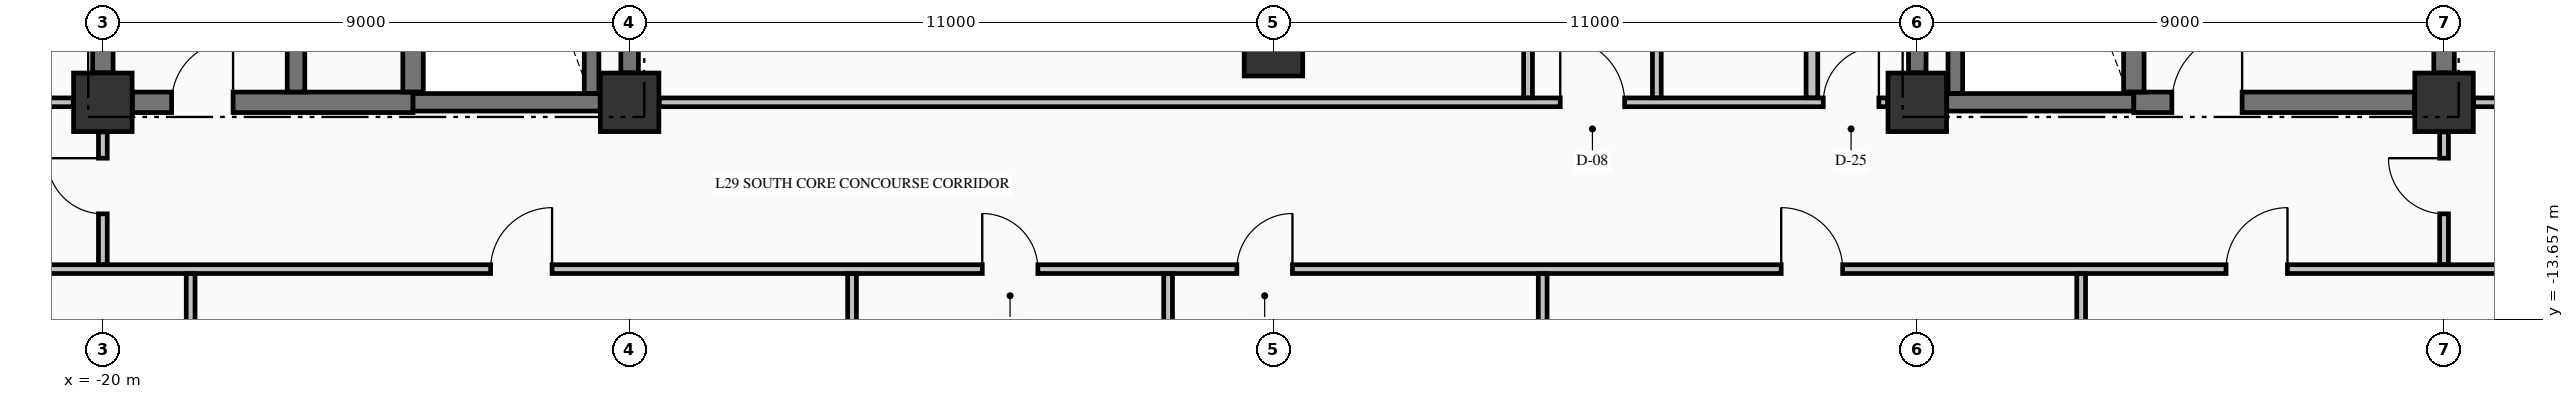
"""IFC4 building model, lengths in metres.
Left out: names, types, materials, properties, quantities, classifications, styles, units other than length and angle.
Written with IfcOpenShell. Run it as: python <this file> out.ifc"""

import sys

from ifc_helpers import new_model, si_unit, direction, frame, frame_2d, origin, origin_2d, place, context, subcontext, project, spatial, rectangle, extrude, element, fill, save


model = new_model("IFC4")
c1 = context("Model", 3, precision=1e-05, world=origin(), true_north=direction((0.0, 1.0)))
c2 = subcontext(c1, "Body", "Model", "MODEL_VIEW")
j1 = project(units=[si_unit("LENGTHUNIT", "METRE"), si_unit("PLANEANGLEUNIT", "RADIAN")], contexts=[c1])
p1 = place(None, origin())
s1 = spatial("IfcSite", under=j1, at=p1, CompositionType="ELEMENT")
p2 = place(p1, origin())
s2 = spatial("IfcBuilding", under=s1, at=p2, CompositionType="ELEMENT")
p3 = place(p2, frame((0.0, 0.0, 116.35)))
s3 = spatial("IfcBuildingStorey", under=s2, at=p3, CompositionType="ELEMENT", Elevation=116.35)
for number, where, z_axis, x_axis in (
    (1, (-20.0, -9.95, -0.425), (0.0, 0.0, 1.0), (1.0, 0.0, 0.0)),
    (2, (-11.0, -9.95, -0.425), (0.0, 0.0, 1.0), (1.0, 0.0, 0.0)),
    (3, (11.0, -9.95, -0.425), (0.0, 0.0, 1.0), (1.0, 0.0, 0.0)),
    (4, (20.0, -9.95, -0.425), (0.0, 0.0, 1.0), (1.0, 0.0, 0.0)),
    (5, (0.0, -9.0, -0.425), (0.0, 0.0, 1.0), (1.0, 0.0, 0.0)),
):
    element("IfcColumn", number, at=place(p3, frame(where, z_axis=z_axis, x_axis=x_axis)), inside=s3, PredefinedType="COLUMN", context=c2, shape_type="SweptSolid", body=[
        extrude(rectangle(XDim=1.0, YDim=1.0, at=origin_2d()), origin(), (0.0, 0.0, 1.0), 5.0),
    ])
p4 = place(p3, frame((-19.496, -9.95, 0.0), z_axis=(0.0, 0.0, 1.0), x_axis=(1.0, 0.0, 0.0)))
e6 = element("IfcWall", 6, at=p4, inside=s3, PredefinedType="SHEAR", context=c2, shape_type="SweptSolid", body=[
    extrude(rectangle(XDim=4.796, YDim=0.35, at=frame_2d((2.398, 0.0))), origin(), (0.0, 0.0, 1.0), 4.575),
])
p5 = place(p4, frame((0.671, 0.0, 0.0)))
e7 = element("IfcOpeningElement", 7, at=p5, cuts=e6, PredefinedType="OPENING", context=c2, shape_type="SweptSolid", body=[
    extrude(rectangle(XDim=1.05, YDim=2.15, at=frame_2d((0.525, 1.075))), frame((0.0, 0.185, 0.0), z_axis=(0.0, -1.0, 0.0), x_axis=(1.0, 0.0, 0.0)), (0.0, 0.0, 1.0), 0.37),
])
for number, where, z_axis, x_axis in (
    (8, (-14.7, -9.95, 0.0), (0.0, 0.0, 1.0), (1.0, 0.0, 0.0)),
    (9, (11.504, -9.95, 0.0), (0.0, 0.0, 1.0), (1.0, 0.0, 0.0)),
):
    element("IfcWall", number, at=place(p3, frame(where, z_axis=z_axis, x_axis=x_axis)), inside=s3, PredefinedType="SHEAR", context=c2, shape_type="SweptSolid", body=[
        extrude(rectangle(XDim=3.196, YDim=0.3, at=frame_2d((1.598, 0.0))), origin(), (0.0, 0.0, 1.0), 4.575),
    ])
p6 = place(p3, frame((14.7, -9.95, 0.0), z_axis=(0.0, 0.0, 1.0), x_axis=(1.0, 0.0, 0.0)))
e10 = element("IfcWall", 10, at=p6, inside=s3, PredefinedType="SHEAR", context=c2, shape_type="SweptSolid", body=[
    extrude(rectangle(XDim=4.796, YDim=0.35, at=frame_2d((2.398, 0.0))), origin(), (0.0, 0.0, 1.0), 4.575),
])
p7 = place(p6, frame((0.65, 0.0, 0.0)))
e11 = element("IfcOpeningElement", 11, at=p7, cuts=e10, PredefinedType="OPENING", context=c2, shape_type="SweptSolid", body=[
    extrude(rectangle(XDim=1.2, YDim=2.15, at=frame_2d((0.6, 1.075))), frame((0.0, 0.185, 0.0), z_axis=(0.0, -1.0, 0.0), x_axis=(1.0, 0.0, 0.0)), (0.0, 0.0, 1.0), 0.37),
])
p8 = place(p3, frame((-22.835, -12.8, 0.0), z_axis=(0.0, 0.0, 1.0), x_axis=(1.0, 0.0, 0.0)))
e12 = element("IfcWall", 12, at=p8, inside=s3, PredefinedType="PARTITIONING", context=c2, shape_type="SweptSolid", body=[
    extrude(rectangle(XDim=50.67, YDim=0.15, at=frame_2d((25.335, 0.0))), origin(), (0.0, 0.0, 1.0), 4.575),
])
p9 = place(p8, frame((9.46, 0.0, 0.0)))
e13 = element("IfcOpeningElement", 13, at=p9, cuts=e12, PredefinedType="OPENING", context=c2, shape_type="SweptSolid", body=[
    extrude(rectangle(XDim=1.05, YDim=2.15, at=frame_2d((0.525, 1.075))), frame((0.0, 0.085, 0.0), z_axis=(0.0, -1.0, 0.0), x_axis=(1.0, 0.0, 0.0)), (0.0, 0.0, 1.0), 0.17),
])
p10 = place(p8, frame((17.86, 0.0, 0.0)))
e14 = element("IfcOpeningElement", 14, at=p10, cuts=e12, PredefinedType="OPENING", context=c2, shape_type="SweptSolid", body=[
    extrude(rectangle(XDim=0.95, YDim=2.15, at=frame_2d((0.475, 1.075))), frame((0.0, 0.085, 0.0), z_axis=(0.0, -1.0, 0.0), x_axis=(1.0, 0.0, 0.0)), (0.0, 0.0, 1.0), 0.17),
])
p11 = place(p8, frame((22.21, 0.0, 0.0)))
e15 = element("IfcOpeningElement", 15, at=p11, cuts=e12, PredefinedType="OPENING", context=c2, shape_type="SweptSolid", body=[
    extrude(rectangle(XDim=0.95, YDim=2.02, at=frame_2d((0.475, 1.01))), frame((0.0, 0.085, 0.0), z_axis=(0.0, -1.0, 0.0), x_axis=(1.0, 0.0, 0.0)), (0.0, 0.0, 1.0), 0.17),
])
p12 = place(p8, frame((31.51, 0.0, 0.0)))
e16 = element("IfcOpeningElement", 16, at=p12, cuts=e12, PredefinedType="OPENING", context=c2, shape_type="SweptSolid", body=[
    extrude(rectangle(XDim=1.05, YDim=2.15, at=frame_2d((0.525, 1.075))), frame((0.0, 0.085, 0.0), z_axis=(0.0, -1.0, 0.0), x_axis=(1.0, 0.0, 0.0)), (0.0, 0.0, 1.0), 0.17),
])
p13 = place(p8, frame((39.11, 0.0, 0.0)))
e17 = element("IfcOpeningElement", 17, at=p13, cuts=e12, PredefinedType="OPENING", context=c2, shape_type="SweptSolid", body=[
    extrude(rectangle(XDim=1.05, YDim=2.15, at=frame_2d((0.525, 1.075))), frame((0.0, 0.085, 0.0), z_axis=(0.0, -1.0, 0.0), x_axis=(1.0, 0.0, 0.0)), (0.0, 0.0, 1.0), 0.17),
])
p14 = place(p3, frame((-22.835, -9.95, 0.0), z_axis=(0.0, 0.0, 1.0), x_axis=(1.0, 0.0, 0.0)))
e18 = element("IfcWall", 18, at=p14, inside=s3, PredefinedType="PARTITIONING", context=c2, shape_type="SweptSolid", body=[
    extrude(rectangle(XDim=2.329, YDim=0.15, at=frame_2d((1.165, 0.0))), origin(), (0.0, 0.0, 1.0), 4.575),
])
p15 = place(p14, frame((0.835, 0.0, 0.0)))
e19 = element("IfcOpeningElement", 19, at=p15, cuts=e18, PredefinedType="OPENING", context=c2, shape_type="SweptSolid", body=[
    extrude(rectangle(XDim=1.0, YDim=2.15, at=frame_2d((0.5, 1.075))), frame((0.0, 0.085, 0.0), z_axis=(0.0, -1.0, 0.0), x_axis=(1.0, 0.0, 0.0)), (0.0, 0.0, 1.0), 0.17),
])
p16 = place(p3, frame((-10.494, -9.95, 0.0), z_axis=(0.0, 0.0, 1.0), x_axis=(1.0, 0.0, 0.0)))
e20 = element("IfcWall", 20, at=p16, inside=s3, PredefinedType="PARTITIONING", context=c2, shape_type="SweptSolid", body=[
    extrude(rectangle(XDim=20.988, YDim=0.15, at=frame_2d((10.494, 0.0))), origin(), (0.0, 0.0, 1.0), 4.575),
])
p17 = place(p16, frame((15.394, 0.0, 0.0)))
e21 = element("IfcOpeningElement", 21, at=p17, cuts=e20, PredefinedType="OPENING", context=c2, shape_type="SweptSolid", body=[
    extrude(rectangle(XDim=1.1, YDim=2.15, at=frame_2d((0.55, 1.075))), frame((0.0, 0.085, 0.0), z_axis=(0.0, -1.0, 0.0), x_axis=(1.0, 0.0, 0.0)), (0.0, 0.0, 1.0), 0.17),
])
p18 = place(p16, frame((19.888, 0.0, 0.0)))
e22 = element("IfcOpeningElement", 22, at=p18, cuts=e20, PredefinedType="OPENING", context=c2, shape_type="SweptSolid", body=[
    extrude(rectangle(XDim=0.95, YDim=2.02, at=frame_2d((0.475, 1.01))), frame((0.0, 0.085, 0.0), z_axis=(0.0, -1.0, 0.0), x_axis=(1.0, 0.0, 0.0)), (0.0, 0.0, 1.0), 0.17),
])
p19 = place(p3, frame((20.506, -9.95, 0.0), z_axis=(0.0, 0.0, 1.0), x_axis=(1.0, 0.0, 0.0)))
e23 = element("IfcWall", 23, at=p19, inside=s3, PredefinedType="PARTITIONING", context=c2, shape_type="SweptSolid", body=[
    extrude(rectangle(XDim=7.329, YDim=0.15, at=frame_2d((3.665, 0.0))), origin(), (0.0, 0.0, 1.0), 4.575),
])
p20 = place(p19, frame((3.019, 0.0, 0.0)))
e24 = element("IfcOpeningElement", 24, at=p20, cuts=e23, PredefinedType="OPENING", context=c2, shape_type="SweptSolid", body=[
    extrude(rectangle(XDim=0.95, YDim=2.02, at=frame_2d((0.475, 1.01))), frame((0.0, 0.085, 0.0), z_axis=(0.0, -1.0, 0.0), x_axis=(1.0, 0.0, 0.0)), (0.0, 0.0, 1.0), 0.17),
])
p21 = place(p3, frame((-20.0, -9.446, 0.0), z_axis=(0.0, 0.0, 1.0), x_axis=(0.0, 1.0, 0.0)))
e25 = element("IfcWall", 25, at=p21, inside=s3, PredefinedType="SHEAR", context=c2, shape_type="SweptSolid", body=[
    extrude(rectangle(XDim=8.942, YDim=0.35, at=frame_2d((4.471, 0.0))), origin(), (0.0, 0.0, 1.0), 4.575),
])
p22 = place(p3, frame((-16.7, -9.773, 0.0), z_axis=(0.0, 0.0, 1.0), x_axis=(0.0, 1.0, 0.0)))
e26 = element("IfcWall", 26, at=p22, inside=s3, PredefinedType="SHEAR", context=c2, shape_type="SweptSolid", body=[
    extrude(rectangle(XDim=9.371, YDim=0.3, at=frame_2d((4.686, 0.0))), origin(), (0.0, 0.0, 1.0), 4.575),
])
p23 = place(p3, frame((-14.7, -9.773, 0.0), z_axis=(0.0, 0.0, 1.0), x_axis=(0.0, 1.0, 0.0)))
e27 = element("IfcWall", 27, at=p23, inside=s3, PredefinedType="SHEAR", context=c2, shape_type="SweptSolid", body=[
    extrude(rectangle(XDim=9.371, YDim=0.35, at=frame_2d((4.686, 0.0))), origin(), (0.0, 0.0, 1.0), 4.575),
])
p24 = place(p3, frame((-11.65, -9.798, 0.0), z_axis=(0.0, 0.0, 1.0), x_axis=(0.0, 1.0, 0.0)))
e28 = element("IfcWall", 28, at=p24, inside=s3, PredefinedType="SOLIDWALL", context=c2, shape_type="SweptSolid", body=[
    extrude(rectangle(XDim=9.396, YDim=0.25, at=frame_2d((4.698, 0.0))), origin(), (0.0, 0.0, 1.0), 4.575),
])
for number, where, z_axis, x_axis in (
    (29, (-11.0, -9.446, 0.0), (0.0, 0.0, 1.0), (0.0, 1.0, 0.0)),
    (30, (11.0, -9.446, 0.0), (0.0, 0.0, 1.0), (0.0, 1.0, 0.0)),
):
    element("IfcWall", number, at=place(p3, frame(where, z_axis=z_axis, x_axis=x_axis)), inside=s3, PredefinedType="SHEAR", context=c2, shape_type="SweptSolid", body=[
        extrude(rectangle(XDim=8.942, YDim=0.3, at=frame_2d((4.471, 0.0))), origin(), (0.0, 0.0, 1.0), 4.575),
    ])
p25 = place(p3, frame((11.65, -9.798, 0.0), z_axis=(0.0, 0.0, 1.0), x_axis=(0.0, 1.0, 0.0)))
e31 = element("IfcWall", 31, at=p25, inside=s3, PredefinedType="SOLIDWALL", context=c2, shape_type="SweptSolid", body=[
    extrude(rectangle(XDim=9.396, YDim=0.25, at=frame_2d((4.698, 0.0))), origin(), (0.0, 0.0, 1.0), 4.575),
])
p26 = place(p3, frame((14.7, -9.773, 0.0), z_axis=(0.0, 0.0, 1.0), x_axis=(0.0, 1.0, 0.0)))
e32 = element("IfcWall", 32, at=p26, inside=s3, PredefinedType="SHEAR", context=c2, shape_type="SweptSolid", body=[
    extrude(rectangle(XDim=9.371, YDim=0.35, at=frame_2d((4.686, 0.0))), origin(), (0.0, 0.0, 1.0), 4.575),
])
p27 = place(p3, frame((20.0, -9.446, 0.0), z_axis=(0.0, 0.0, 1.0), x_axis=(0.0, 1.0, 0.0)))
e33 = element("IfcWall", 33, at=p27, inside=s3, PredefinedType="SHEAR", context=c2, shape_type="SweptSolid", body=[
    extrude(rectangle(XDim=2.269, YDim=0.35, at=frame_2d((1.135, 0.0))), origin(), (0.0, 0.0, 1.0), 4.575),
])
p28 = place(p3, frame((-20.0, -12.722, 0.0), z_axis=(0.0, 0.0, 1.0), x_axis=(0.0, 1.0, 0.0)))
e34 = element("IfcWall", 34, at=p28, inside=s3, PredefinedType="PARTITIONING", context=c2, shape_type="SweptSolid", body=[
    extrude(rectangle(XDim=2.266, YDim=0.15, at=frame_2d((1.133, 0.0))), origin(), (0.0, 0.0, 1.0), 4.065),
])
p29 = place(p28, frame((0.867, 0.0, 0.0)))
e35 = element("IfcOpeningElement", 35, at=p29, cuts=e34, PredefinedType="OPENING", context=c2, shape_type="SweptSolid", body=[
    extrude(rectangle(XDim=0.95, YDim=2.02, at=frame_2d((0.475, 1.01))), frame((0.0, 0.085, 0.0), z_axis=(0.0, -1.0, 0.0), x_axis=(1.0, 0.0, 0.0)), (0.0, 0.0, 1.0), 0.17),
])
p30 = place(p3, frame((-18.5, -20.394, 0.0), z_axis=(0.0, 0.0, 1.0), x_axis=(0.0, 1.0, 0.0)))
e36 = element("IfcWall", 36, at=p30, inside=s3, PredefinedType="PARTITIONING", context=c2, shape_type="SweptSolid", body=[
    extrude(rectangle(XDim=7.516, YDim=0.15, at=frame_2d((3.758, 0.0))), origin(), (0.0, 0.0, 1.0), 4.575),
])
for number, where, z_axis, x_axis in (
    (37, (-7.2, -25.335, 0.0), (0.0, 0.0, 1.0), (0.0, 1.0, 0.0)),
    (38, (-1.8, -25.335, 0.0), (0.0, 0.0, 1.0), (0.0, 1.0, 0.0)),
):
    element("IfcWall", number, at=place(p3, frame(where, z_axis=z_axis, x_axis=x_axis)), inside=s3, PredefinedType="PARTITIONING", context=c2, shape_type="SweptSolid", body=[
        extrude(rectangle(XDim=12.457, YDim=0.15, at=frame_2d((6.229, 0.0))), origin(), (0.0, 0.0, 1.0), 4.575),
    ])
p31 = place(p3, frame((4.35, -9.872, 0.0), z_axis=(0.0, 0.0, 1.0), x_axis=(0.0, 1.0, 0.0)))
e39 = element("IfcWall", 39, at=p31, inside=s3, PredefinedType="PARTITIONING", context=c2, shape_type="SweptSolid", body=[
    extrude(rectangle(XDim=9.544, YDim=0.15, at=frame_2d((4.772, 0.0))), origin(), (0.0, 0.0, 1.0), 4.575),
])
p32 = place(p3, frame((4.6, -25.335, 0.0), z_axis=(0.0, 0.0, 1.0), x_axis=(0.0, 1.0, 0.0)))
e40 = element("IfcWall", 40, at=p32, inside=s3, PredefinedType="PARTITIONING", context=c2, shape_type="SweptSolid", body=[
    extrude(rectangle(XDim=12.457, YDim=0.15, at=frame_2d((6.229, 0.0))), origin(), (0.0, 0.0, 1.0), 4.575),
])
p33 = place(p3, frame((6.55, -9.872, 0.0), z_axis=(0.0, 0.0, 1.0), x_axis=(0.0, 1.0, 0.0)))
e41 = element("IfcWall", 41, at=p33, inside=s3, PredefinedType="PARTITIONING", context=c2, shape_type="SweptSolid", body=[
    extrude(rectangle(XDim=4.419, YDim=0.15, at=frame_2d((2.209, 0.0))), origin(), (0.0, 0.0, 1.0), 4.575),
])
p34 = place(p33, frame((1.997, 0.0, 0.0)))
e42 = element("IfcOpeningElement", 42, at=p34, cuts=e41, PredefinedType="OPENING", context=c2, shape_type="SweptSolid", body=[
    extrude(rectangle(XDim=0.95, YDim=2.15, at=frame_2d((0.475, 1.075))), frame((0.0, 0.085, 0.0), z_axis=(0.0, -1.0, 0.0), x_axis=(1.0, 0.0, 0.0)), (0.0, 0.0, 1.0), 0.17),
])
p35 = place(p3, frame((9.2, -9.872, 0.0), z_axis=(0.0, 0.0, 1.0), x_axis=(0.0, 1.0, 0.0)))
e43 = element("IfcWall", 43, at=p35, inside=s3, PredefinedType="PARTITIONING", context=c2, shape_type="SweptSolid", body=[
    extrude(rectangle(XDim=4.419, YDim=0.2, at=frame_2d((2.209, 0.0))), origin(), (0.0, 0.0, 1.0), 4.575),
])
p36 = place(p3, frame((13.8, -25.335, 0.0), z_axis=(0.0, 0.0, 1.0), x_axis=(0.0, 1.0, 0.0)))
e44 = element("IfcWall", 44, at=p36, inside=s3, PredefinedType="PARTITIONING", context=c2, shape_type="SweptSolid", body=[
    extrude(rectangle(XDim=12.457, YDim=0.15, at=frame_2d((6.229, 0.0))), origin(), (0.0, 0.0, 1.0), 4.575),
])
p37 = place(p3, frame((20.0, -12.722, 0.0), z_axis=(0.0, 0.0, 1.0), x_axis=(0.0, 1.0, 0.0)))
e45 = element("IfcWall", 45, at=p37, inside=s3, PredefinedType="PARTITIONING", context=c2, shape_type="SweptSolid", body=[
    extrude(rectangle(XDim=2.266, YDim=0.15, at=frame_2d((1.133, 0.0))), origin(), (0.0, 0.0, 1.0), 4.03),
])
p38 = place(p37, frame((0.867, 0.0, 0.0)))
e46 = element("IfcOpeningElement", 46, at=p38, cuts=e45, PredefinedType="OPENING", context=c2, shape_type="SweptSolid", body=[
    extrude(rectangle(XDim=0.95, YDim=2.02, at=frame_2d((0.475, 1.01))), frame((0.0, 0.085, 0.0), z_axis=(0.0, -1.0, 0.0), x_axis=(1.0, 0.0, 0.0)), (0.0, 0.0, 1.0), 0.17),
])
p39 = place(p5, origin())
e47 = element("IfcDoor", 47, at=p39, inside=s3, OperationType="SINGLE_SWING_RIGHT", PredefinedType="DOOR", context=c2, shape_type="SweptSolid", body=[
    extrude(rectangle(XDim=1.05, YDim=2.15, at=frame_2d((0.525, 1.075))), frame((0.0, 0.025, 0.0), z_axis=(0.0, -1.0, 0.0), x_axis=(1.0, 0.0, 0.0)), (0.0, 0.0, 1.0), 0.05),
])
fill(e7, e47)
p40 = place(p7, origin())
e48 = element("IfcDoor", 48, at=p40, inside=s3, OperationType="SINGLE_SWING_RIGHT", PredefinedType="DOOR", context=c2, shape_type="SweptSolid", body=[
    extrude(rectangle(XDim=1.2, YDim=2.15, at=frame_2d((0.6, 1.075))), frame((0.0, 0.025, 0.0), z_axis=(0.0, -1.0, 0.0), x_axis=(1.0, 0.0, 0.0)), (0.0, 0.0, 1.0), 0.05),
])
fill(e11, e48)
p41 = place(p17, origin())
e49 = element("IfcDoor", 49, at=p41, inside=s3, OperationType="SINGLE_SWING_LEFT", PredefinedType="DOOR", context=c2, shape_type="SweptSolid", body=[
    extrude(rectangle(XDim=1.1, YDim=2.15, at=frame_2d((0.55, 1.075))), frame((0.0, 0.025, 0.0), z_axis=(0.0, -1.0, 0.0), x_axis=(1.0, 0.0, 0.0)), (0.0, 0.0, 1.0), 0.05),
])
fill(e21, e49)
p42 = place(p9, origin())
e50 = element("IfcDoor", 50, at=p42, inside=s3, OperationType="SINGLE_SWING_RIGHT", PredefinedType="DOOR", context=c2, shape_type="SweptSolid", body=[
    extrude(rectangle(XDim=1.05, YDim=2.15, at=frame_2d((0.525, 1.075))), frame((0.0, 0.025, 0.0), z_axis=(0.0, -1.0, 0.0), x_axis=(1.0, 0.0, 0.0)), (0.0, 0.0, 1.0), 0.05),
])
fill(e13, e50)
p43 = place(p10, origin())
e51 = element("IfcDoor", 51, at=p43, inside=s3, OperationType="SINGLE_SWING_LEFT", PredefinedType="DOOR", context=c2, shape_type="SweptSolid", body=[
    extrude(rectangle(XDim=0.95, YDim=2.15, at=frame_2d((0.475, 1.075))), frame((0.0, 0.025, 0.0), z_axis=(0.0, -1.0, 0.0), x_axis=(1.0, 0.0, 0.0)), (0.0, 0.0, 1.0), 0.05),
])
fill(e14, e51)
p44 = place(p11, origin())
e52 = element("IfcDoor", 52, at=p44, inside=s3, OperationType="SINGLE_SWING_RIGHT", PredefinedType="DOOR", context=c2, shape_type="SweptSolid", body=[
    extrude(rectangle(XDim=0.95, YDim=2.02, at=frame_2d((0.475, 1.01))), frame((0.0, 0.025, 0.0), z_axis=(0.0, -1.0, 0.0), x_axis=(1.0, 0.0, 0.0)), (0.0, 0.0, 1.0), 0.05),
])
fill(e15, e52)
p45 = place(p12, origin())
e53 = element("IfcDoor", 53, at=p45, inside=s3, OperationType="SINGLE_SWING_LEFT", PredefinedType="DOOR", context=c2, shape_type="SweptSolid", body=[
    extrude(rectangle(XDim=1.05, YDim=2.15, at=frame_2d((0.525, 1.075))), frame((0.0, 0.025, 0.0), z_axis=(0.0, -1.0, 0.0), x_axis=(1.0, 0.0, 0.0)), (0.0, 0.0, 1.0), 0.05),
])
fill(e16, e53)
p46 = place(p13, origin())
e54 = element("IfcDoor", 54, at=p46, inside=s3, OperationType="SINGLE_SWING_RIGHT", PredefinedType="DOOR", context=c2, shape_type="SweptSolid", body=[
    extrude(rectangle(XDim=1.05, YDim=2.15, at=frame_2d((0.525, 1.075))), frame((0.0, 0.025, 0.0), z_axis=(0.0, -1.0, 0.0), x_axis=(1.0, 0.0, 0.0)), (0.0, 0.0, 1.0), 0.05),
])
fill(e17, e54)
p47 = place(p18, origin())
e55 = element("IfcDoor", 55, at=p47, inside=s3, OperationType="SINGLE_SWING_RIGHT", PredefinedType="DOOR", context=c2, shape_type="SweptSolid", body=[
    extrude(rectangle(XDim=0.95, YDim=2.02, at=frame_2d((0.475, 1.01))), frame((0.0, 0.025, 0.0), z_axis=(0.0, -1.0, 0.0), x_axis=(1.0, 0.0, 0.0)), (0.0, 0.0, 1.0), 0.05),
])
fill(e22, e55)
p48 = place(p29, origin())
e56 = element("IfcDoor", 56, at=p48, inside=s3, OperationType="SINGLE_SWING_RIGHT", PredefinedType="DOOR", context=c2, shape_type="SweptSolid", body=[
    extrude(rectangle(XDim=0.95, YDim=2.02, at=frame_2d((0.475, 1.01))), frame((0.0, 0.025, 0.0), z_axis=(0.0, -1.0, 0.0), x_axis=(1.0, 0.0, 0.0)), (0.0, 0.0, 1.0), 0.05),
])
fill(e35, e56)
p49 = place(p38, origin())
e57 = element("IfcDoor", 57, at=p49, inside=s3, OperationType="SINGLE_SWING_RIGHT", PredefinedType="DOOR", context=c2, shape_type="SweptSolid", body=[
    extrude(rectangle(XDim=0.95, YDim=2.02, at=frame_2d((0.475, 1.01))), frame((0.0, 0.025, 0.0), z_axis=(0.0, -1.0, 0.0), x_axis=(1.0, 0.0, 0.0)), (0.0, 0.0, 1.0), 0.05),
])
fill(e46, e57)
save(model, sys.argv[1])
